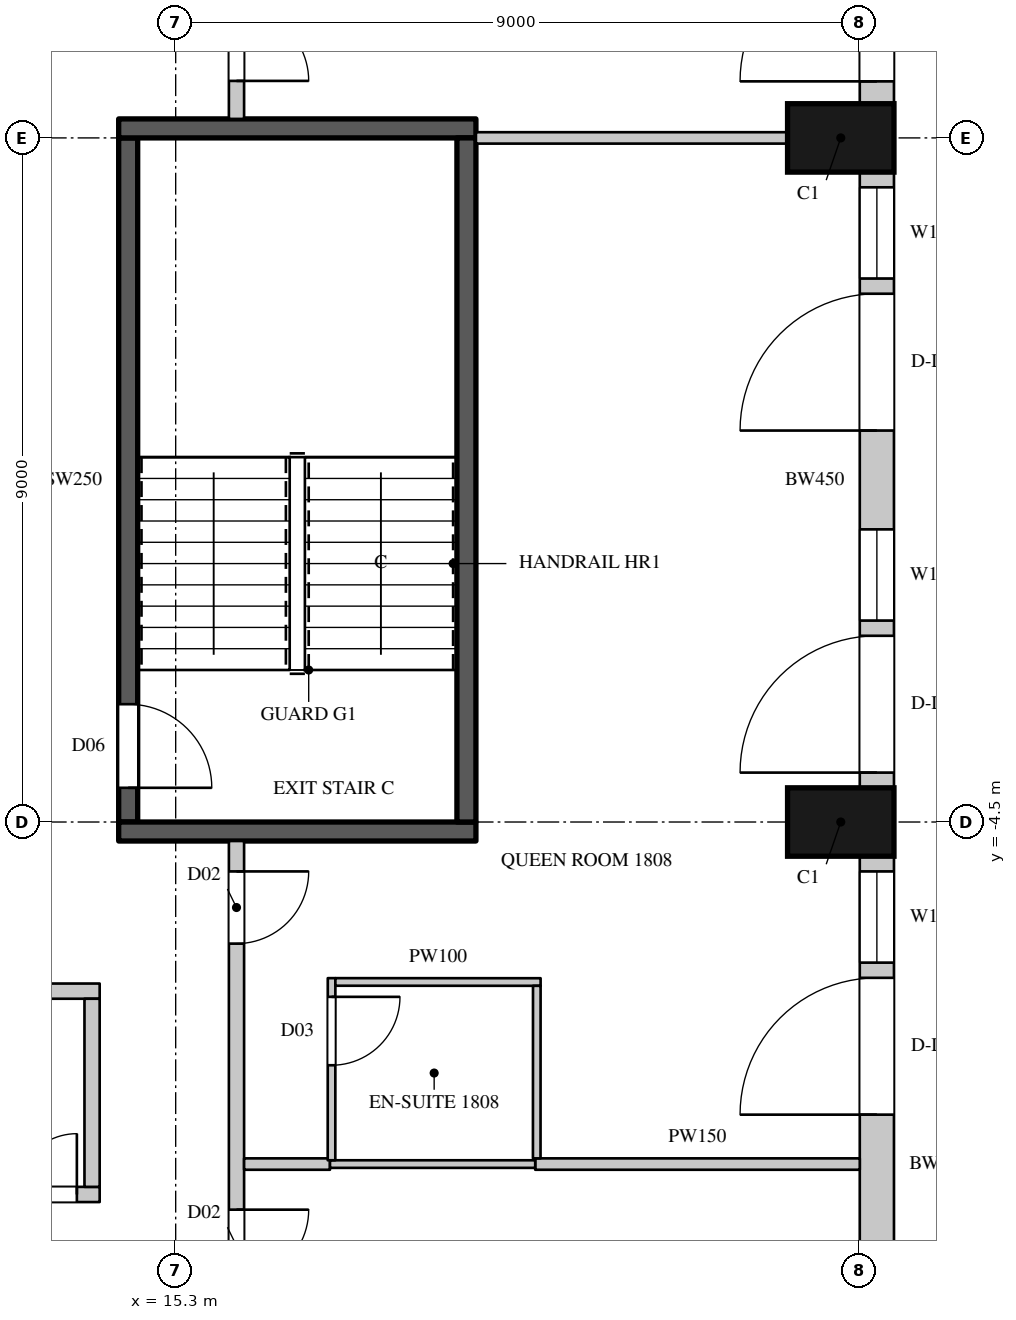
"""IFC4 building model, lengths in metres.
Left out: names, types, materials, properties, quantities, classifications, styles, units other than length and angle.
Written with IfcOpenShell. Run it as: python <this file> out.ifc"""

import sys

from ifc_helpers import new_model, si_unit, direction, frame, frame_2d, origin, origin_2d, place, context, subcontext, project, spatial, rectangle, extrude, element, fill, save


model = new_model("IFC4")
c1 = context("Model", 3, precision=1e-05, world=origin(), true_north=direction((0.0, 1.0)))
c2 = subcontext(c1, "Body", "Model", "MODEL_VIEW")
j1 = project(units=[si_unit("LENGTHUNIT", "METRE"), si_unit("PLANEANGLEUNIT", "RADIAN")], contexts=[c1])
p1 = place(None, origin())
s1 = spatial("IfcSite", under=j1, at=p1, CompositionType="ELEMENT")
p2 = place(p1, origin())
s2 = spatial("IfcBuilding", under=s1, at=p2, CompositionType="ELEMENT")
p3 = place(p2, frame((0.0, 0.0, 95.1)))
s3 = spatial("IfcBuildingStorey", under=s2, at=p3, CompositionType="ELEMENT", Elevation=95.1)
for number, where, z_axis, x_axis in (
    (1, (24.05, -4.5, 0.0), (0.0, 0.0, 1.0), (0.0, 1.0, 0.0)),
    (2, (24.05, 4.5, 0.0), (0.0, 0.0, 1.0), (0.0, 1.0, 0.0)),
):
    element("IfcColumn", number, at=place(p3, frame(where, z_axis=z_axis, x_axis=x_axis)), inside=s3, PredefinedType="COLUMN", context=c2, shape_type="SweptSolid", body=[
        extrude(rectangle(XDim=0.9, YDim=1.4, at=origin_2d()), origin(), (0.0, 0.0, 1.0), 3.6),
    ])
p4 = place(p3, frame((24.525, -13.05, 0.0), z_axis=(0.0, 0.0, 1.0), x_axis=(0.0, 1.0, 0.0)))
e3 = element("IfcWall", 3, at=p4, inside=s3, PredefinedType="SOLIDWALL", context=c2, shape_type="SweptSolid", body=[
    extrude(rectangle(XDim=8.1, YDim=0.45, at=frame_2d((4.05, 0.0))), origin(), (0.0, 0.0, 1.0), 3.3),
])
p5 = place(p4, frame((0.9, 0.0, 0.0)))
e4 = element("IfcOpeningElement", 4, at=p5, cuts=e3, PredefinedType="OPENING", context=c2, shape_type="SweptSolid", body=[
    extrude(rectangle(XDim=1.8, YDim=2.4, at=frame_2d((0.9, 1.2))), frame((0.0, 0.235, 0.0), z_axis=(0.0, -1.0, 0.0), x_axis=(1.0, 0.0, 0.0)), (0.0, 0.0, 1.0), 0.47),
])
p6 = place(p4, frame((4.7, 0.0, 0.0)))
e5 = element("IfcOpeningElement", 5, at=p6, cuts=e3, PredefinedType="OPENING", context=c2, shape_type="SweptSolid", body=[
    extrude(rectangle(XDim=1.8, YDim=2.4, at=frame_2d((0.9, 1.2))), frame((0.0, 0.235, 0.0), z_axis=(0.0, -1.0, 0.0), x_axis=(1.0, 0.0, 0.0)), (0.0, 0.0, 1.0), 0.47),
])
p7 = place(p4, frame((6.7, 0.0, 1.05)))
e6 = element("IfcOpeningElement", 6, at=p7, cuts=e3, PredefinedType="OPENING", context=c2, shape_type="SweptSolid", body=[
    extrude(rectangle(XDim=1.2, YDim=2.0, at=frame_2d((0.6, 1.0))), frame((0.0, 0.235, 0.0), z_axis=(0.0, -1.0, 0.0), x_axis=(1.0, 0.0, 0.0)), (0.0, 0.0, 1.0), 0.47),
])
p8 = place(p3, frame((24.525, -4.05, 0.0), z_axis=(0.0, 0.0, 1.0), x_axis=(0.0, 1.0, 0.0)))
e7 = element("IfcWall", 7, at=p8, inside=s3, PredefinedType="SOLIDWALL", context=c2, shape_type="SweptSolid", body=[
    extrude(rectangle(XDim=8.1, YDim=0.45, at=frame_2d((4.05, 0.0))), origin(), (0.0, 0.0, 1.0), 3.3),
])
p9 = place(p8, frame((0.2, 0.0, 0.0)))
e8 = element("IfcOpeningElement", 8, at=p9, cuts=e7, PredefinedType="OPENING", context=c2, shape_type="SweptSolid", body=[
    extrude(rectangle(XDim=1.8, YDim=2.4, at=frame_2d((0.9, 1.2))), frame((0.0, 0.235, 0.0), z_axis=(0.0, -1.0, 0.0), x_axis=(1.0, 0.0, 0.0)), (0.0, 0.0, 1.0), 0.47),
])
p10 = place(p8, frame((2.2, 0.0, 1.05)))
e9 = element("IfcOpeningElement", 9, at=p10, cuts=e7, PredefinedType="OPENING", context=c2, shape_type="SweptSolid", body=[
    extrude(rectangle(XDim=1.2, YDim=2.0, at=frame_2d((0.6, 1.0))), frame((0.0, 0.235, 0.0), z_axis=(0.0, -1.0, 0.0), x_axis=(1.0, 0.0, 0.0)), (0.0, 0.0, 1.0), 0.47),
])
p11 = place(p8, frame((4.7, 0.0, 0.0)))
e10 = element("IfcOpeningElement", 10, at=p11, cuts=e7, PredefinedType="OPENING", context=c2, shape_type="SweptSolid", body=[
    extrude(rectangle(XDim=1.8, YDim=2.4, at=frame_2d((0.9, 1.2))), frame((0.0, 0.235, 0.0), z_axis=(0.0, -1.0, 0.0), x_axis=(1.0, 0.0, 0.0)), (0.0, 0.0, 1.0), 0.47),
])
p12 = place(p8, frame((6.7, 0.0, 1.05)))
e11 = element("IfcOpeningElement", 11, at=p12, cuts=e7, PredefinedType="OPENING", context=c2, shape_type="SweptSolid", body=[
    extrude(rectangle(XDim=1.2, YDim=2.0, at=frame_2d((0.6, 1.0))), frame((0.0, 0.235, 0.0), z_axis=(0.0, -1.0, 0.0), x_axis=(1.0, 0.0, 0.0)), (0.0, 0.0, 1.0), 0.47),
])
p13 = place(p3, frame((24.525, 4.95, 0.0), z_axis=(0.0, 0.0, 1.0), x_axis=(0.0, 1.0, 0.0)))
e12 = element("IfcWall", 12, at=p13, inside=s3, PredefinedType="SOLIDWALL", context=c2, shape_type="SweptSolid", body=[
    extrude(rectangle(XDim=8.439, YDim=0.45, at=frame_2d((4.219, 0.0))), origin(), (0.0, 0.0, 1.0), 3.3),
])
p14 = place(p13, frame((0.294, 0.0, 0.0)))
e13 = element("IfcOpeningElement", 13, at=p14, cuts=e12, PredefinedType="OPENING", context=c2, shape_type="SweptSolid", body=[
    extrude(rectangle(XDim=1.8, YDim=2.4, at=frame_2d((0.9, 1.2))), frame((0.0, 0.235, 0.0), z_axis=(0.0, -1.0, 0.0), x_axis=(1.0, 0.0, 0.0)), (0.0, 0.0, 1.0), 0.47),
])
p15 = place(p13, frame((2.294, 0.0, 1.05)))
e14 = element("IfcOpeningElement", 14, at=p15, cuts=e12, PredefinedType="OPENING", context=c2, shape_type="SweptSolid", body=[
    extrude(rectangle(XDim=1.2, YDim=2.0, at=frame_2d((0.6, 1.0))), frame((0.0, 0.235, 0.0), z_axis=(0.0, -1.0, 0.0), x_axis=(1.0, 0.0, 0.0)), (0.0, 0.0, 1.0), 0.47),
])
p16 = place(p13, frame((5.232, 0.0, 1.05)))
e15 = element("IfcOpeningElement", 15, at=p16, cuts=e12, PredefinedType="OPENING", context=c2, shape_type="SweptSolid", body=[
    extrude(rectangle(XDim=2.7, YDim=2.0, at=frame_2d((1.35, 1.0))), frame((0.0, 0.235, 0.0), z_axis=(0.0, -1.0, 0.0), x_axis=(1.0, 0.0, 0.0)), (0.0, 0.0, 1.0), 0.47),
])
p17 = place(p3, frame((10.9, -9.4, 0.0), z_axis=(0.0, 0.0, 1.0), x_axis=(1.0, 0.0, 0.0)))
e16 = element("IfcWall", 16, at=p17, inside=s3, PredefinedType="PARTITIONING", context=c2, shape_type="SweptSolid", body=[
    extrude(rectangle(XDim=3.4, YDim=0.2, at=frame_2d((1.7, 0.0))), origin(), (0.0, 0.0, 1.0), 3.3),
])
p18 = place(p17, frame((1.5, 0.0, 0.0)))
e17 = element("IfcOpeningElement", 17, at=p18, cuts=e16, PredefinedType="OPENING", context=c2, shape_type="SweptSolid", body=[
    extrude(rectangle(XDim=1.6, YDim=2.4, at=frame_2d((0.8, 1.2))), frame((0.0, 0.11, 0.0), z_axis=(0.0, -1.0, 0.0), x_axis=(1.0, 0.0, 0.0)), (0.0, 0.0, 1.0), 0.22),
])
p19 = place(p3, frame((10.9, -6.725, 0.0), z_axis=(0.0, 0.0, 1.0), x_axis=(1.0, 0.0, 0.0)))
e18 = element("IfcWall", 18, at=p19, inside=s3, PredefinedType="PARTITIONING", context=c2, shape_type="SweptSolid", body=[
    extrude(rectangle(XDim=3.4, YDim=0.2, at=frame_2d((1.7, 0.0))), origin(), (0.0, 0.0, 1.0), 3.3),
])
p20 = place(p3, frame((14.2, -9.3, 0.0), z_axis=(0.0, 0.0, 1.0), x_axis=(0.0, 1.0, 0.0)))
e19 = element("IfcWall", 19, at=p20, inside=s3, PredefinedType="PARTITIONING", context=c2, shape_type="SweptSolid", body=[
    extrude(rectangle(XDim=2.475, YDim=0.2, at=frame_2d((1.238, 0.0))), origin(), (0.0, 0.0, 1.0), 3.3),
])
p21 = place(p3, frame((16.1, -17.5, 0.0), z_axis=(0.0, 0.0, 1.0), x_axis=(0.0, 1.0, 0.0)))
e20 = element("IfcWall", 20, at=p21, inside=s3, PredefinedType="PARTITIONING", context=c2, shape_type="SweptSolid", body=[
    extrude(rectangle(XDim=12.75, YDim=0.2, at=frame_2d((6.375, 0.0))), origin(), (0.0, 0.0, 1.0), 3.3),
])
p22 = place(p21, frame((2.75, 0.0, 0.0)))
e21 = element("IfcOpeningElement", 21, at=p22, cuts=e20, PredefinedType="OPENING", context=c2, shape_type="SweptSolid", body=[
    extrude(rectangle(XDim=0.95, YDim=2.2, at=frame_2d((0.475, 1.1))), frame((0.0, 0.11, 0.0), z_axis=(0.0, -1.0, 0.0), x_axis=(1.0, 0.0, 0.0)), (0.0, 0.0, 1.0), 0.22),
])
p23 = place(p21, frame((6.95, 0.0, 0.0)))
e22 = element("IfcOpeningElement", 22, at=p23, cuts=e20, PredefinedType="OPENING", context=c2, shape_type="SweptSolid", body=[
    extrude(rectangle(XDim=0.95, YDim=2.2, at=frame_2d((0.475, 1.1))), frame((0.0, 0.11, 0.0), z_axis=(0.0, -1.0, 0.0), x_axis=(1.0, 0.0, 0.0)), (0.0, 0.0, 1.0), 0.22),
])
p24 = place(p21, frame((11.4, 0.0, 0.0)))
e23 = element("IfcOpeningElement", 23, at=p24, cuts=e20, PredefinedType="OPENING", context=c2, shape_type="SweptSolid", body=[
    extrude(rectangle(XDim=0.95, YDim=2.2, at=frame_2d((0.475, 1.1))), frame((0.0, 0.11, 0.0), z_axis=(0.0, -1.0, 0.0), x_axis=(1.0, 0.0, 0.0)), (0.0, 0.0, 1.0), 0.22),
])
p25 = place(p3, frame((16.1, 4.75, 0.0), z_axis=(0.0, 0.0, 1.0), x_axis=(0.0, 1.0, 0.0)))
e24 = element("IfcWall", 24, at=p25, inside=s3, PredefinedType="PARTITIONING", context=c2, shape_type="SweptSolid", body=[
    extrude(rectangle(XDim=12.65, YDim=0.2, at=frame_2d((6.325, 0.0))), origin(), (0.0, 0.0, 1.0), 3.3),
])
p26 = place(p25, frame((0.5, 0.0, 0.0)))
e25 = element("IfcOpeningElement", 25, at=p26, cuts=e24, PredefinedType="OPENING", context=c2, shape_type="SweptSolid", body=[
    extrude(rectangle(XDim=0.95, YDim=2.2, at=frame_2d((0.475, 1.1))), frame((0.0, 0.11, 0.0), z_axis=(0.0, -1.0, 0.0), x_axis=(1.0, 0.0, 0.0)), (0.0, 0.0, 1.0), 0.22),
])
p27 = place(p25, frame((6.9, 0.0, 0.0)))
e26 = element("IfcOpeningElement", 26, at=p27, cuts=e24, PredefinedType="OPENING", context=c2, shape_type="SweptSolid", body=[
    extrude(rectangle(XDim=0.95, YDim=2.2, at=frame_2d((0.475, 1.1))), frame((0.0, 0.11, 0.0), z_axis=(0.0, -1.0, 0.0), x_axis=(1.0, 0.0, 0.0)), (0.0, 0.0, 1.0), 0.22),
])
p28 = place(p3, frame((16.2, -9.0, 0.0), z_axis=(0.0, 0.0, 1.0), x_axis=(1.0, 0.0, 0.0)))
e27 = element("IfcWall", 27, at=p28, inside=s3, PredefinedType="PARTITIONING", context=c2, shape_type="SweptSolid", body=[
    extrude(rectangle(XDim=1.13, YDim=0.15, at=frame_2d((0.565, 0.0))), origin(), (0.0, 0.0, 1.0), 2.65),
])
p29 = place(p3, frame((19.25, 4.5, 0.0), z_axis=(0.0, 0.0, 1.0), x_axis=(1.0, 0.0, 0.0)))
e28 = element("IfcWall", 28, at=p29, inside=s3, PredefinedType="PARTITIONING", context=c2, shape_type="SweptSolid", body=[
    extrude(rectangle(XDim=4.1, YDim=0.15, at=frame_2d((2.05, 0.0))), origin(), (0.0, 0.0, 1.0), 3.3),
])
p30 = place(p3, frame((20.03, -9.0, 0.0), z_axis=(0.0, 0.0, 1.0), x_axis=(1.0, 0.0, 0.0)))
e29 = element("IfcWall", 29, at=p30, inside=s3, PredefinedType="PARTITIONING", context=c2, shape_type="SweptSolid", body=[
    extrude(rectangle(XDim=4.27, YDim=0.15, at=frame_2d((2.135, 0.0))), origin(), (0.0, 0.0, 1.0), 2.65),
])
p31 = place(p3, frame((14.675, -4.5, 0.0), z_axis=(0.0, 0.0, 1.0), x_axis=(0.0, 1.0, 0.0)))
e30 = element("IfcWall", 30, at=p31, inside=s3, PredefinedType="SHEAR", context=c2, shape_type="SweptSolid", body=[
    extrude(rectangle(XDim=9.0, YDim=0.25, at=frame_2d((4.5, 0.0))), origin(), (0.0, 0.0, 1.0), 3.3),
])
p32 = place(p31, frame((0.45, 0.0, 0.0)))
e31 = element("IfcOpeningElement", 31, at=p32, cuts=e30, PredefinedType="OPENING", context=c2, shape_type="SweptSolid", body=[
    extrude(rectangle(XDim=1.1, YDim=2.2, at=frame_2d((0.55, 1.1))), frame((0.0, 0.135, 0.0), z_axis=(0.0, -1.0, 0.0), x_axis=(1.0, 0.0, 0.0)), (0.0, 0.0, 1.0), 0.27),
])
for number, where, z_axis, x_axis in (
    (32, (14.55, -4.625, 0.0), (0.0, 0.0, 1.0), (1.0, 0.0, 0.0)),
    (33, (14.55, 4.625, 0.0), (0.0, 0.0, 1.0), (1.0, 0.0, 0.0)),
):
    element("IfcWall", number, at=place(p3, frame(where, z_axis=z_axis, x_axis=x_axis)), inside=s3, PredefinedType="SHEAR", context=c2, shape_type="SweptSolid", body=[
        extrude(rectangle(XDim=4.7, YDim=0.25, at=frame_2d((2.35, 0.0))), origin(), (0.0, 0.0, 1.0), 3.3),
    ])
p33 = place(p3, frame((19.125, -4.5, 0.0), z_axis=(0.0, 0.0, 1.0), x_axis=(0.0, 1.0, 0.0)))
e34 = element("IfcWall", 34, at=p33, inside=s3, PredefinedType="SHEAR", context=c2, shape_type="SweptSolid", body=[
    extrude(rectangle(XDim=9.0, YDim=0.25, at=frame_2d((4.5, 0.0))), origin(), (0.0, 0.0, 1.0), 3.3),
])
p34 = place(p3, frame((17.33, -9.0, 0.0), z_axis=(0.0, 0.0, 1.0), x_axis=(1.0, 0.0, 0.0)))
e35 = element("IfcWall", 35, at=p34, inside=s3, PredefinedType="PARTITIONING", context=c2, shape_type="SweptSolid", body=[
    extrude(rectangle(XDim=2.7, YDim=0.1, at=frame_2d((1.35, 0.0))), origin(), (0.0, 0.0, 1.0), 2.65),
])
p35 = place(p3, frame((17.35, -8.95, 0.0), z_axis=(0.0, 0.0, 1.0), x_axis=(0.000407580973, 0.999999916939, 0.0)))
e36 = element("IfcWall", 36, at=p35, inside=s3, PredefinedType="PARTITIONING", context=c2, shape_type="SweptSolid", body=[
    extrude(rectangle(XDim=2.396, YDim=0.1, at=frame_2d((1.198, 0.0))), origin(), (0.0, 0.0, 1.0), 3.3),
])
p36 = place(p35, frame((1.25, 0.0, 0.0)))
e37 = element("IfcOpeningElement", 37, at=p36, cuts=e36, PredefinedType="OPENING", context=c2, shape_type="SweptSolid", body=[
    extrude(rectangle(XDim=0.9, YDim=2.2, at=frame_2d((0.45, 1.1))), frame((0.0, 0.06, 0.0), z_axis=(0.0, -1.0, 0.0), x_axis=(1.0, 0.0, 0.0)), (0.0, 0.0, 1.0), 0.12),
])
p37 = place(p3, frame((17.401, -6.604, 0.0), z_axis=(0.0, 0.0, 1.0), x_axis=(0.9999999346, -0.000361663629, 0.0)))
e38 = element("IfcWall", 38, at=p37, inside=s3, PredefinedType="PARTITIONING", context=c2, shape_type="SweptSolid", body=[
    extrude(rectangle(XDim=2.7, YDim=0.1, at=frame_2d((1.35, 0.0))), origin(), (0.0, 0.0, 1.0), 3.3),
])
p38 = place(p3, frame((20.05, -8.925, 0.0), z_axis=(0.0, 0.0, 1.0), x_axis=(0.000430200003, 0.999999907464, 0.0)))
e39 = element("IfcWall", 39, at=p38, inside=s3, PredefinedType="PARTITIONING", context=c2, shape_type="SweptSolid", body=[
    extrude(rectangle(XDim=2.27, YDim=0.1, at=frame_2d((1.135, 0.0))), origin(), (0.0, 0.0, 1.0), 3.3),
])
p39 = place(p6, origin())
e40 = element("IfcDoor", 40, at=p39, inside=s3, OperationType="SLIDING_TO_LEFT", PredefinedType="DOOR", context=c2, shape_type="SweptSolid", body=[
    extrude(rectangle(XDim=1.8, YDim=2.4, at=frame_2d((0.9, 1.2))), frame((0.0, 0.13, 0.0), z_axis=(0.0, -1.0, 0.0), x_axis=(1.0, 0.0, 0.0)), (0.0, 0.0, 1.0), 0.05),
])
fill(e5, e40)
p40 = place(p7, origin())
e41 = element("IfcWindow", 41, at=p40, inside=s3, PartitioningType="SINGLE_PANEL", PredefinedType="WINDOW", context=c2, shape_type="SweptSolid", body=[
    extrude(rectangle(XDim=1.2, YDim=2.0, at=frame_2d((0.6, 1.0))), frame((0.0, 0.135, 0.0), z_axis=(0.0, -1.0, 0.0), x_axis=(1.0, 0.0, 0.0)), (0.0, 0.0, 1.0), 0.06),
])
fill(e6, e41)
p41 = place(p9, origin())
e42 = element("IfcDoor", 42, at=p41, inside=s3, OperationType="SLIDING_TO_LEFT", PredefinedType="DOOR", context=c2, shape_type="SweptSolid", body=[
    extrude(rectangle(XDim=1.8, YDim=2.4, at=frame_2d((0.9, 1.2))), frame((0.0, 0.13, 0.0), z_axis=(0.0, -1.0, 0.0), x_axis=(1.0, 0.0, 0.0)), (0.0, 0.0, 1.0), 0.05),
])
fill(e8, e42)
p42 = place(p10, origin())
e43 = element("IfcWindow", 43, at=p42, inside=s3, PartitioningType="SINGLE_PANEL", PredefinedType="WINDOW", context=c2, shape_type="SweptSolid", body=[
    extrude(rectangle(XDim=1.2, YDim=2.0, at=frame_2d((0.6, 1.0))), frame((0.0, 0.135, 0.0), z_axis=(0.0, -1.0, 0.0), x_axis=(1.0, 0.0, 0.0)), (0.0, 0.0, 1.0), 0.06),
])
fill(e9, e43)
p43 = place(p11, origin())
e44 = element("IfcDoor", 44, at=p43, inside=s3, OperationType="SLIDING_TO_LEFT", PredefinedType="DOOR", context=c2, shape_type="SweptSolid", body=[
    extrude(rectangle(XDim=1.8, YDim=2.4, at=frame_2d((0.9, 1.2))), frame((0.0, 0.13, 0.0), z_axis=(0.0, -1.0, 0.0), x_axis=(1.0, 0.0, 0.0)), (0.0, 0.0, 1.0), 0.05),
])
fill(e10, e44)
p44 = place(p12, origin())
e45 = element("IfcWindow", 45, at=p44, inside=s3, PartitioningType="SINGLE_PANEL", PredefinedType="WINDOW", context=c2, shape_type="SweptSolid", body=[
    extrude(rectangle(XDim=1.2, YDim=2.0, at=frame_2d((0.6, 1.0))), frame((0.0, 0.135, 0.0), z_axis=(0.0, -1.0, 0.0), x_axis=(1.0, 0.0, 0.0)), (0.0, 0.0, 1.0), 0.06),
])
fill(e11, e45)
p45 = place(p14, origin())
e46 = element("IfcDoor", 46, at=p45, inside=s3, OperationType="SLIDING_TO_LEFT", PredefinedType="DOOR", context=c2, shape_type="SweptSolid", body=[
    extrude(rectangle(XDim=1.8, YDim=2.4, at=frame_2d((0.9, 1.2))), frame((0.0, 0.13, 0.0), z_axis=(0.0, -1.0, 0.0), x_axis=(1.0, 0.0, 0.0)), (0.0, 0.0, 1.0), 0.05),
])
fill(e13, e46)
p46 = place(p18, origin())
e47 = element("IfcDoor", 47, at=p46, inside=s3, OperationType="DOUBLE_DOOR_SINGLE_SWING", PredefinedType="DOOR", context=c2, shape_type="SweptSolid", body=[
    extrude(rectangle(XDim=1.6, YDim=2.4, at=frame_2d((0.8, 1.2))), frame((0.0, 0.025, 0.0), z_axis=(0.0, -1.0, 0.0), x_axis=(1.0, 0.0, 0.0)), (0.0, 0.0, 1.0), 0.05),
])
fill(e17, e47)
p47 = place(p23, origin())
e48 = element("IfcDoor", 48, at=p47, inside=s3, OperationType="SINGLE_SWING_LEFT", PredefinedType="DOOR", context=c2, shape_type="SweptSolid", body=[
    extrude(rectangle(XDim=0.95, YDim=2.2, at=frame_2d((0.475, 1.1))), frame((0.0, 0.025, 0.0), z_axis=(0.0, -1.0, 0.0), x_axis=(1.0, 0.0, 0.0)), (0.0, 0.0, 1.0), 0.05),
])
fill(e22, e48)
p48 = place(p24, origin())
e49 = element("IfcDoor", 49, at=p48, inside=s3, OperationType="SINGLE_SWING_LEFT", PredefinedType="DOOR", context=c2, shape_type="SweptSolid", body=[
    extrude(rectangle(XDim=0.95, YDim=2.2, at=frame_2d((0.475, 1.1))), frame((0.0, 0.025, 0.0), z_axis=(0.0, -1.0, 0.0), x_axis=(1.0, 0.0, 0.0)), (0.0, 0.0, 1.0), 0.05),
])
fill(e23, e49)
p49 = place(p36, origin())
e50 = element("IfcDoor", 50, at=p49, inside=s3, OperationType="SINGLE_SWING_LEFT", PredefinedType="DOOR", context=c2, shape_type="SweptSolid", body=[
    extrude(rectangle(XDim=0.9, YDim=2.2, at=frame_2d((0.45, 1.1))), frame((0.0, 0.025, 0.0), z_axis=(0.0, -1.0, 0.0), x_axis=(1.0, 0.0, 0.0)), (0.0, 0.0, 1.0), 0.05),
])
fill(e37, e50)
p50 = place(p26, origin())
e51 = element("IfcDoor", 51, at=p50, inside=s3, OperationType="SINGLE_SWING_RIGHT", PredefinedType="DOOR", context=c2, shape_type="SweptSolid", body=[
    extrude(rectangle(XDim=0.95, YDim=2.2, at=frame_2d((0.475, 1.1))), frame((0.0, 0.025, 0.0), z_axis=(0.0, -1.0, 0.0), x_axis=(1.0, 0.0, 0.0)), (0.0, 0.0, 1.0), 0.05),
])
fill(e25, e51)
p51 = place(p32, origin())
e52 = element("IfcDoor", 52, at=p51, inside=s3, OperationType="SINGLE_SWING_RIGHT", PredefinedType="DOOR", context=c2, shape_type="SweptSolid", body=[
    extrude(rectangle(XDim=1.1, YDim=2.2, at=frame_2d((0.55, 1.1))), frame((0.0, 0.025, 0.0), z_axis=(0.0, -1.0, 0.0), x_axis=(1.0, 0.0, 0.0)), (0.0, 0.0, 1.0), 0.05),
])
fill(e31, e52)
save(model, sys.argv[1])
